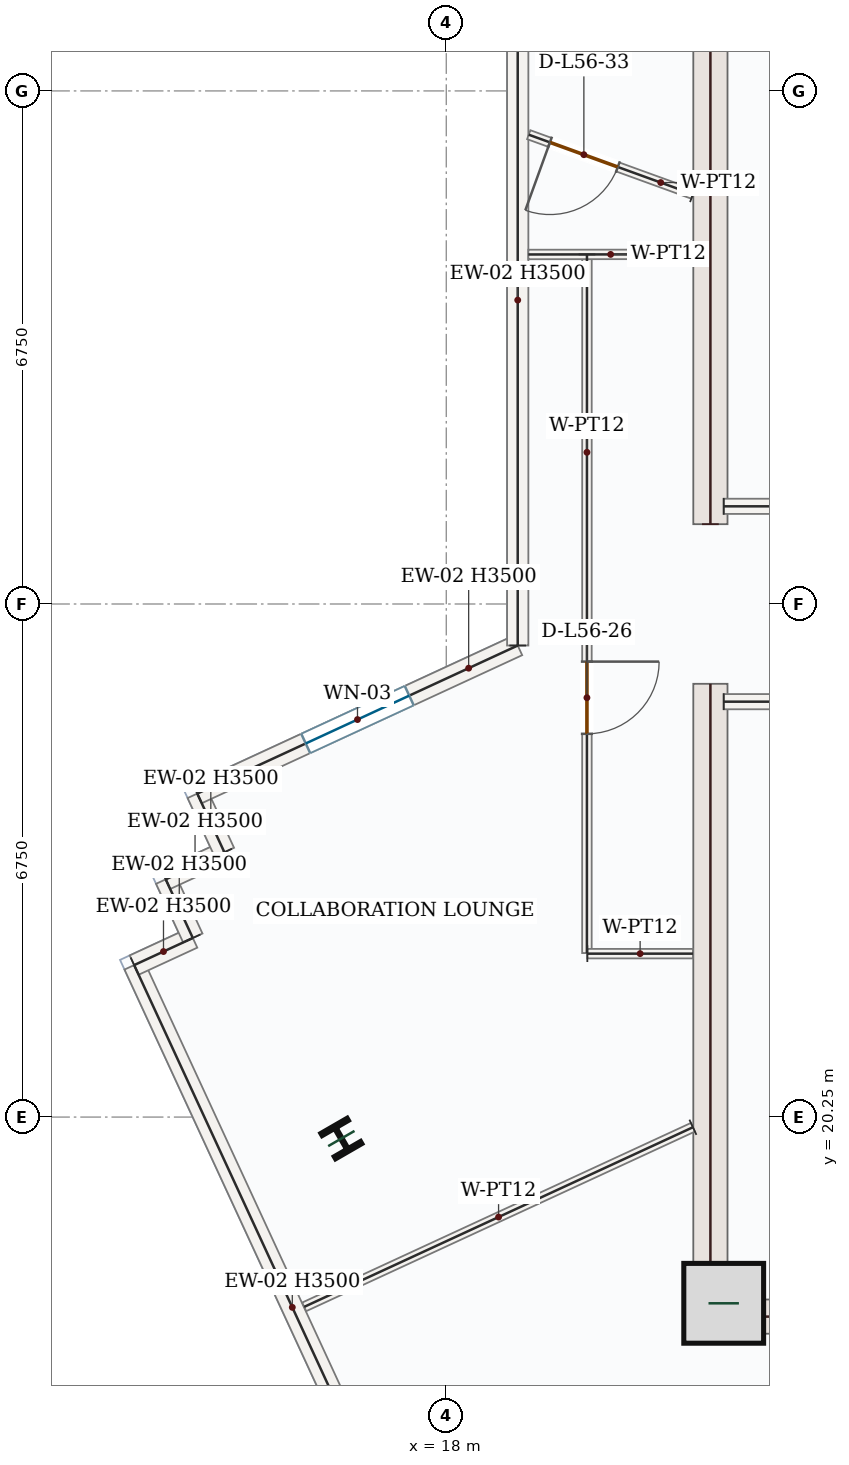
"""IFC4 building model, lengths in metres.
Left out: names, types, materials, properties, quantities, classifications, styles, units other than length and angle.
Written with IfcOpenShell. Run it as: python <this file> out.ifc"""

import sys

from ifc_helpers import new_model, si_unit, direction, frame, frame_2d, origin, origin_2d, place, context, subcontext, project, spatial, rectangle, i_section, extrude, source, transform, mapped, element, fill, save


model = new_model("IFC4")
c1 = context("Model", 3, precision=1e-05, world=origin(), true_north=direction((0.0, 1.0)))
c2 = subcontext(c1, "Body", "Model", "MODEL_VIEW")
j1 = project(units=[si_unit("LENGTHUNIT", "METRE"), si_unit("PLANEANGLEUNIT", "RADIAN")], contexts=[c1])
p1 = place(None, origin())
s1 = spatial("IfcSite", under=j1, at=p1, CompositionType="ELEMENT")
p2 = place(p1, origin())
s2 = spatial("IfcBuilding", under=s1, at=p2, CompositionType="ELEMENT")
p3 = place(p2, frame((0.0, 0.0, 239.1)))
s3 = spatial("IfcBuildingStorey", under=s2, at=p3, CompositionType="ELEMENT", Elevation=239.1)
m1 = source(origin(), c2, "Body", "SweptSolid", [
    extrude(rectangle(XDim=8.55, YDim=0.45, at=frame_2d((4.275, 0.0))), origin(), (0.0, 0.0, 1.0), 3.5),
])
for number, where, z_axis, x_axis in (
    (1, (21.475, 17.4, 0.0), (0.0, 0.0, 1.0), (0.0, 1.0, 0.0)),
    (2, (21.475, 28.05, 0.0), (0.0, 0.0, 1.0), (0.0, 1.0, 0.0)),
):
    element("IfcWall", number, at=place(p3, frame(where, z_axis=z_axis, x_axis=x_axis)), inside=s3, PredefinedType="SHEAR", context=c2, shape_type="MappedRepresentation", body=[
        mapped(m1, transform((0.0, 0.0, 0.0), x_axis=(1.0, 0.0, 0.0), y_axis=(0.0, 1.0, 0.0), z_axis=(0.0, 0.0, 1.0), scale=1.0)),
    ])
m2 = source(origin(), c2, "Body", "SweptSolid", [
    extrude(rectangle(XDim=7.1, YDim=0.45, at=frame_2d((3.55, 0.0))), origin(), (0.0, 0.0, 1.0), 3.5),
])
p4 = place(p3, frame((21.7, 17.625, 0.0), z_axis=(0.0, 0.0, 1.0), x_axis=(1.0, 0.0, 0.0)))
e3 = element("IfcWall", 3, at=p4, inside=s3, PredefinedType="SHEAR", context=c2, shape_type="MappedRepresentation", body=[
    mapped(m2, transform((0.0, 0.0, 0.0), x_axis=(1.0, 0.0, 0.0), y_axis=(0.0, 1.0, 0.0), z_axis=(0.0, 0.0, 1.0), scale=1.0)),
])
m3 = source(origin(), c2, "Body", "SweptSolid", [
    extrude(rectangle(XDim=1.05, YDim=1.05, at=origin_2d()), origin(), (0.0, 0.0, 1.0), 3.75),
])
p5 = place(p3, frame((21.65, 17.8, 0.0), z_axis=(0.0, 0.0, 1.0), x_axis=(1.0, 0.0, 0.0)))
e4 = element("IfcColumn", 4, at=p5, inside=s3, PredefinedType="COLUMN", context=c2, shape_type="MappedRepresentation", body=[
    mapped(m3, transform((0.0, 0.0, 0.0), x_axis=(1.0, 0.0, 0.0), y_axis=(0.0, 1.0, 0.0), z_axis=(0.0, 0.0, 1.0), scale=1.0)),
])
m4 = source(origin(), c2, "Body", "SweptSolid", [
    extrude(i_section(OverallWidth=0.399, OverallDepth=0.386, WebThickness=0.021, FlangeThickness=0.033, FilletRadius=0.018, at=origin_2d()), origin(), (0.0, 0.0, 1.0), 3.75),
])
p6 = place(p3, frame((16.62, 19.968, 0.0), z_axis=(0.0, 0.0, 1.0), x_axis=(0.866025403784, 0.5, 0.0)))
e5 = element("IfcColumn", 5, at=p6, inside=s3, PredefinedType="COLUMN", context=c2, shape_type="MappedRepresentation", body=[
    mapped(m4, transform((0.0, 0.0, 0.0), x_axis=(1.0, 0.0, 0.0), y_axis=(0.0, 1.0, 0.0), z_axis=(0.0, 0.0, 1.0), scale=1.0)),
])
m5 = source(origin(), c2, "Body", "SweptSolid", [
    extrude(rectangle(XDim=9.92, YDim=0.28, at=frame_2d((4.96, 0.0))), origin(), (0.0, 0.0, 1.0), 3.5),
])
p7 = place(p3, frame((18.055, 13.244, 0.0), z_axis=(0.0, 0.0, 1.0), x_axis=(-0.41946703495, 0.907770569357, 0.0)))
e6 = element("IfcWall", 6, at=p7, inside=s3, PredefinedType="SOLIDWALL", context=c2, shape_type="MappedRepresentation", body=[
    mapped(m5, transform((0.0, 0.0, 0.0), x_axis=(1.0, 0.0, 0.0), y_axis=(0.0, 1.0, 0.0), z_axis=(0.0, 0.0, 1.0), scale=1.0)),
])
m6 = source(origin(), c2, "Body", "SweptSolid", [
    extrude(rectangle(XDim=0.85, YDim=0.28, at=frame_2d((0.425, 0.0))), origin(), (0.0, 0.0, 1.0), 3.5),
])
for number, where, z_axis, x_axis in (
    (7, (13.894, 22.25, 0.0), (0.0, 0.0, 1.0), (0.908, 0.419, 0.0)),
    (8, (14.666, 22.606, 0.0), (0.0, 0.0, 1.0), (-0.419, 0.908, 0.0)),
):
    element("IfcWall", number, at=place(p3, frame(where, z_axis=z_axis, x_axis=x_axis)), inside=s3, PredefinedType="SOLIDWALL", context=c2, shape_type="MappedRepresentation", body=[
        mapped(m6, transform((0.0, 0.0, 0.0), x_axis=(1.0, 0.0, 0.0), y_axis=(0.0, 1.0, 0.0), z_axis=(0.0, 0.0, 1.0), scale=1.0)),
    ])
m7 = source(origin(), c2, "Body", "SweptSolid", [
    extrude(rectangle(XDim=0.85, YDim=0.28, at=frame_2d((0.425, 0.0))), origin(), (0.0, 0.0, 1.0), 3.5),
])
for number, where, z_axis, x_axis in (
    (9, (14.309, 23.378, 0.0), (0.0, 0.0, 1.0), (0.908, 0.419, 0.0)),
    (10, (15.081, 23.734, 0.0), (0.0, 0.0, 1.0), (-0.419, 0.908, 0.0)),
):
    element("IfcWall", number, at=place(p3, frame(where, z_axis=z_axis, x_axis=x_axis)), inside=s3, PredefinedType="SOLIDWALL", context=c2, shape_type="MappedRepresentation", body=[
        mapped(m7, transform((0.0, 0.0, 0.0), x_axis=(1.0, 0.0, 0.0), y_axis=(0.0, 1.0, 0.0), z_axis=(0.0, 0.0, 1.0), scale=1.0)),
    ])
p8 = place(p3, frame((14.724, 24.506, 0.0), z_axis=(0.0, 0.0, 1.0), x_axis=(0.907756183213, 0.419498166669, 0.0)))
e11 = element("IfcWall", 11, at=p8, inside=s3, PredefinedType="SOLIDWALL", context=c2, shape_type="SweptSolid", body=[
    extrude(rectangle(XDim=4.644, YDim=0.28, at=frame_2d((2.322, 0.0))), origin(), (0.0, 0.0, 1.0), 3.5),
])
p9 = place(p8, frame((1.572, 0.0, 0.85)))
e12 = element("IfcOpeningElement", 12, at=p9, cuts=e11, PredefinedType="OPENING", context=c2, shape_type="SweptSolid", body=[
    extrude(rectangle(XDim=1.5, YDim=1.5, at=frame_2d((0.75, 0.75))), frame((0.0, 0.15, 0.0), z_axis=(0.0, -1.0, 0.0), x_axis=(1.0, 0.0, 0.0)), (0.0, 0.0, 1.0), 0.3),
])
m8 = source(origin(), c2, "Body", "SweptSolid", [
    extrude(rectangle(XDim=9.088, YDim=0.28, at=frame_2d((4.544, 0.0))), origin(), (0.0, 0.0, 1.0), 3.5),
])
p10 = place(p3, frame((18.94, 26.454, 0.0), z_axis=(0.0, 0.0, 1.0), x_axis=(0.0, 1.0, 0.0)))
e13 = element("IfcWall", 13, at=p10, inside=s3, PredefinedType="SOLIDWALL", context=c2, shape_type="MappedRepresentation", body=[
    mapped(m8, transform((0.0, 0.0, 0.0), x_axis=(1.0, 0.0, 0.0), y_axis=(0.0, 1.0, 0.0), z_axis=(0.0, 0.0, 1.0), scale=1.0)),
])
m9 = source(origin(), c2, "Body", "SweptSolid", [
    extrude(rectangle(XDim=4.25, YDim=0.2, at=frame_2d((2.125, 0.0))), origin(), (0.0, 0.0, 1.0), 3.5),
])
for number, where, z_axis, x_axis in (
    (14, (21.65, 25.715, 0.0), (0.0, 0.0, 1.0), (1.0, 0.0, 0.0)),
    (15, (21.65, 28.285, 0.0), (0.0, 0.0, 1.0), (1.0, 0.0, 0.0)),
):
    element("IfcWall", number, at=place(p3, frame(where, z_axis=z_axis, x_axis=x_axis)), inside=s3, PredefinedType="SOLIDWALL", context=c2, shape_type="MappedRepresentation", body=[
        mapped(m9, transform((0.0, 0.0, 0.0), x_axis=(1.0, 0.0, 0.0), y_axis=(0.0, 1.0, 0.0), z_axis=(0.0, 0.0, 1.0), scale=1.0)),
    ])
p11 = place(p3, frame((21.245, 32.391, 0.0), z_axis=(0.0, 0.0, 1.0), x_axis=(-0.940115637779, 0.340855669755, 0.0)))
e16 = element("IfcWall", 16, at=p11, inside=s3, PredefinedType="PARTITIONING", context=c2, shape_type="SweptSolid", body=[
    extrude(rectangle(XDim=2.298, YDim=0.125, at=frame_2d((1.149, 0.0))), origin(), (0.0, 0.0, 1.0), 3.5),
])
p12 = place(p11, frame((1.051, 0.0, 0.0)))
e17 = element("IfcOpeningElement", 17, at=p12, cuts=e16, PredefinedType="OPENING", context=c2, shape_type="SweptSolid", body=[
    extrude(rectangle(XDim=0.95, YDim=2.15, at=frame_2d((0.475, 1.075))), frame((0.0, 0.073, 0.0), z_axis=(0.0, -1.0, 0.0), x_axis=(1.0, 0.0, 0.0)), (0.0, 0.0, 1.0), 0.145),
])
p13 = place(p3, frame((19.851, 31.599, 0.0), z_axis=(0.0, 0.0, 1.0), x_axis=(-7.9685508e-05, -0.999999996825, 0.0)))
e18 = element("IfcWall", 18, at=p13, inside=s3, PredefinedType="PARTITIONING", context=c2, shape_type="SweptSolid", body=[
    extrude(rectangle(XDim=9.191, YDim=0.125, at=frame_2d((4.596, 0.0))), origin(), (0.0, 0.0, 1.0), 3.5),
])
p14 = place(p13, frame((5.357, 0.0, 0.0)))
e19 = element("IfcOpeningElement", 19, at=p14, cuts=e18, PredefinedType="OPENING", context=c2, shape_type="SweptSolid", body=[
    extrude(rectangle(XDim=0.95, YDim=2.15, at=frame_2d((0.475, 1.075))), frame((0.0, 0.073, 0.0), z_axis=(0.0, -1.0, 0.0), x_axis=(1.0, 0.0, 0.0)), (0.0, 0.0, 1.0), 0.145),
])
m10 = source(origin(), c2, "Body", "SweptSolid", [
    extrude(rectangle(XDim=1.389, YDim=0.125, at=frame_2d((0.695, 0.0))), origin(), (0.0, 0.0, 1.0), 3.5),
])
p15 = place(p3, frame((19.856, 22.4, 0.0), z_axis=(0.0, 0.0, 1.0), x_axis=(1.0, 0.0, 0.0)))
e20 = element("IfcWall", 20, at=p15, inside=s3, PredefinedType="PARTITIONING", context=c2, shape_type="MappedRepresentation", body=[
    mapped(m10, transform((0.0, 0.0, 0.0), x_axis=(1.0, 0.0, 0.0), y_axis=(0.0, 1.0, 0.0), z_axis=(0.0, 0.0, 1.0), scale=1.0)),
])
m11 = source(origin(), c2, "Body", "SweptSolid", [
    extrude(rectangle(XDim=5.634, YDim=0.125, at=frame_2d((2.817, 0.0))), origin(), (0.0, 0.0, 1.0), 3.5),
])
p16 = place(p3, frame((21.245, 20.116, 0.0), z_axis=(0.0, 0.0, 1.0), x_axis=(-0.90777538002, -0.419456624014, 0.0)))
e21 = element("IfcWall", 21, at=p16, inside=s3, PredefinedType="PARTITIONING", context=c2, shape_type="MappedRepresentation", body=[
    mapped(m11, transform((0.0, 0.0, 0.0), x_axis=(1.0, 0.0, 0.0), y_axis=(0.0, 1.0, 0.0), z_axis=(0.0, 0.0, 1.0), scale=1.0)),
])
m12 = source(origin(), c2, "Body", "SweptSolid", [
    extrude(rectangle(XDim=2.165, YDim=0.125, at=frame_2d((1.083, 0.0))), origin(), (0.0, 0.0, 1.0), 3.5),
])
p17 = place(p3, frame((21.245, 31.6, 0.0), z_axis=(0.0, 0.0, 1.0), x_axis=(-0.999999688459, -0.000789354738, 0.0)))
e22 = element("IfcWall", 22, at=p17, inside=s3, PredefinedType="PARTITIONING", context=c2, shape_type="MappedRepresentation", body=[
    mapped(m12, transform((0.0, 0.0, 0.0), x_axis=(1.0, 0.0, 0.0), y_axis=(0.0, 1.0, 0.0), z_axis=(0.0, 0.0, 1.0), scale=1.0)),
])
m13 = source(origin(), c2, "Body", "SweptSolid", [
    extrude(rectangle(XDim=1.5, YDim=1.5, at=frame_2d((0.75, 0.75))), frame((0.0, 0.03, 0.0), z_axis=(0.0, -1.0, 0.0), x_axis=(1.0, 0.0, 0.0)), (0.0, 0.0, 1.0), 0.06),
])
p18 = place(p9, origin())
e23 = element("IfcWindow", 23, at=p18, inside=s3, PartitioningType="SINGLE_PANEL", PredefinedType="WINDOW", context=c2, shape_type="MappedRepresentation", body=[
    mapped(m13, transform((0.0, 0.0, 0.0), x_axis=(1.0, 0.0, 0.0), y_axis=(0.0, 1.0, 0.0), z_axis=(0.0, 0.0, 1.0), scale=1.0)),
])
fill(e12, e23)
m14 = source(origin(), c2, "Body", "SweptSolid", [
    extrude(rectangle(XDim=0.95, YDim=2.15, at=frame_2d((0.475, 1.075))), frame((0.0, 0.025, 0.0), z_axis=(0.0, -1.0, 0.0), x_axis=(1.0, 0.0, 0.0)), (0.0, 0.0, 1.0), 0.05),
])
p19 = place(p14, origin())
e24 = element("IfcDoor", 24, at=p19, inside=s3, OperationType="SINGLE_SWING_LEFT", PredefinedType="DOOR", context=c2, shape_type="MappedRepresentation", body=[
    mapped(m14, transform((0.0, 0.0, 0.0), x_axis=(1.0, 0.0, 0.0), y_axis=(0.0, 1.0, 0.0), z_axis=(0.0, 0.0, 1.0), scale=1.0)),
])
fill(e19, e24)
p20 = place(p12, origin())
e25 = element("IfcDoor", 25, at=p20, inside=s3, OperationType="SINGLE_SWING_RIGHT", PredefinedType="DOOR", context=c2, shape_type="MappedRepresentation", body=[
    mapped(m14, transform((0.0, 0.0, 0.0), x_axis=(1.0, 0.0, 0.0), y_axis=(0.0, 1.0, 0.0), z_axis=(0.0, 0.0, 1.0), scale=1.0)),
])
fill(e17, e25)
save(model, sys.argv[1])
